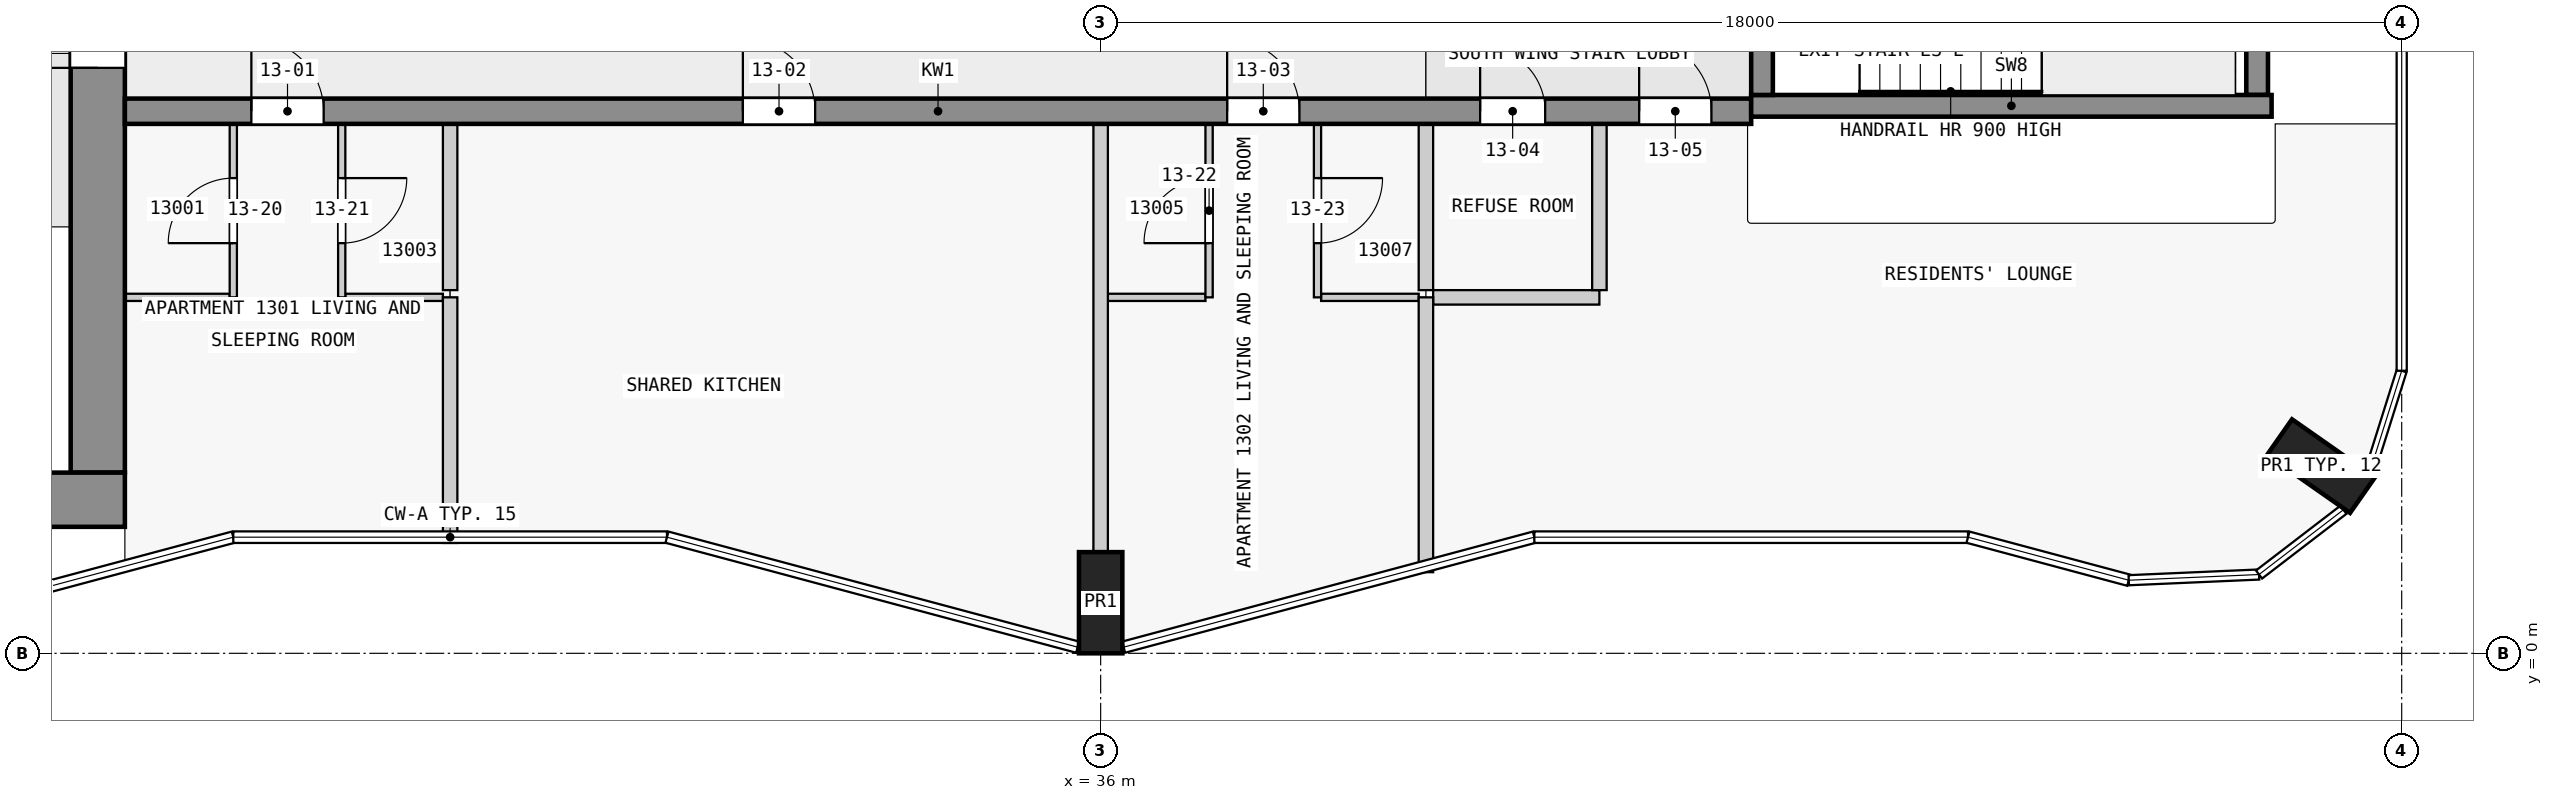
"""IFC4 building model, lengths in metres.
Left out: names, types, materials, properties, quantities, classifications, styles, units other than length and angle.
Written with IfcOpenShell. Run it as: python <this file> out.ifc"""

import sys

from ifc_helpers import new_model, si_unit, direction, frame, frame_2d, origin, origin_2d, place, context, subcontext, project, spatial, rectangle, extrude, element, fill, save


model = new_model("IFC4")
c1 = context("Model", 3, precision=1e-05, world=origin(), true_north=direction((0.0, 1.0)))
c2 = subcontext(c1, "Body", "Model", "MODEL_VIEW")
j1 = project(units=[si_unit("LENGTHUNIT", "METRE"), si_unit("PLANEANGLEUNIT", "RADIAN")], contexts=[c1])
p1 = place(None, origin())
s1 = spatial("IfcSite", under=j1, at=p1, CompositionType="ELEMENT")
p2 = place(p1, origin())
s2 = spatial("IfcBuilding", under=s1, at=p2, CompositionType="ELEMENT")
p3 = place(p2, frame((0.0, 0.0, 54.8)))
s3 = spatial("IfcBuildingStorey", under=s2, at=p3, CompositionType="ELEMENT", Elevation=54.8)
for number, where, z_axis, x_axis in (
    (1, (36.0, 0.7, 0.0), (0.0, 0.0, 1.0), (1.0, 0.0, 0.0)),
    (2, (52.884, 2.59, 0.0), (0.0, 0.0, 1.0), (0.574, 0.819, 0.0)),
):
    element("IfcColumn", number, at=place(p3, frame(where, z_axis=z_axis, x_axis=x_axis)), inside=s3, PredefinedType="COLUMN", context=c2, shape_type="SweptSolid", body=[
        extrude(rectangle(XDim=0.6, YDim=1.4, at=origin_2d()), origin(), (0.0, 0.0, 1.0), 3.5),
    ])
p4 = place(p3, frame((1.55, 2.125, 0.0), z_axis=(0.0, 0.0, 1.0), x_axis=(1.0, 0.0, 0.0)))
e3 = element("IfcWall", 3, at=p4, inside=s3, PredefinedType="SHEAR", context=c2, shape_type="SweptSolid", body=[
    extrude(rectangle(XDim=20.95, YDim=0.75, at=frame_2d((10.475, 0.0))), origin(), (0.0, 0.0, 1.0), 3.25),
])
p5 = place(p3, frame((22.125, 2.5, 0.0), z_axis=(0.0, 0.0, 1.0), x_axis=(0.0, 1.0, 0.0)))
e4 = element("IfcWall", 4, at=p5, inside=s3, PredefinedType="SHEAR", context=c2, shape_type="SweptSolid", body=[
    extrude(rectangle(XDim=14.75, YDim=0.75, at=frame_2d((7.375, 0.0))), origin(), (0.0, 0.0, 1.0), 3.25),
])
p6 = place(p5, frame((5.6, 0.0, 0.0)))
e5 = element("IfcOpeningElement", 5, at=p6, cuts=e4, PredefinedType="OPENING", context=c2, shape_type="SweptSolid", body=[
    extrude(rectangle(XDim=1.8, YDim=2.1, at=frame_2d((0.9, 1.05))), frame((0.0, 0.385, 0.0), z_axis=(0.0, -1.0, 0.0), x_axis=(1.0, 0.0, 0.0)), (0.0, 0.0, 1.0), 0.77),
])
p7 = place(p3, frame((45.15, 7.725, 0.0), z_axis=(0.0, 0.0, 1.0), x_axis=(0.0, 1.0, 0.0)))
e6 = element("IfcWall", 6, at=p7, inside=s3, PredefinedType="SHEAR", context=c2, shape_type="SweptSolid", body=[
    extrude(rectangle(XDim=2.55, YDim=0.3, at=frame_2d((1.275, 0.0))), origin(), (0.0, 0.0, 1.0), 3.5),
])
p8 = place(p7, frame((0.725, 0.0, 0.0)))
e7 = element("IfcOpeningElement", 7, at=p8, cuts=e6, PredefinedType="OPENING", context=c2, shape_type="SweptSolid", body=[
    extrude(rectangle(XDim=1.1, YDim=2.1, at=frame_2d((0.55, 1.05))), frame((0.0, 0.16, 0.0), z_axis=(0.0, -1.0, 0.0), x_axis=(1.0, 0.0, 0.0)), (0.0, 0.0, 1.0), 0.32),
])
p9 = place(p3, frame((52.0, 7.725, 0.0), z_axis=(0.0, 0.0, 1.0), x_axis=(0.0, 1.0, 0.0)))
e8 = element("IfcWall", 8, at=p9, inside=s3, PredefinedType="SHEAR", context=c2, shape_type="SweptSolid", body=[
    extrude(rectangle(XDim=2.55, YDim=0.3, at=frame_2d((1.275, 0.0))), origin(), (0.0, 0.0, 1.0), 3.5),
])
p10 = place(p3, frame((45.0, 7.575, 0.0), z_axis=(0.0, 0.0, 1.0), x_axis=(1.0, 0.0, 0.0)))
e9 = element("IfcWall", 9, at=p10, inside=s3, PredefinedType="SHEAR", context=c2, shape_type="SweptSolid", body=[
    extrude(rectangle(XDim=7.2, YDim=0.3, at=frame_2d((3.6, 0.0))), origin(), (0.0, 0.0, 1.0), 3.5),
])
p11 = place(p3, frame((22.5, 7.5, 0.0), z_axis=(0.0, 0.0, 1.0), x_axis=(1.0, 0.0, 0.0)))
e10 = element("IfcWall", 10, at=p11, inside=s3, PredefinedType="SHEAR", context=c2, shape_type="SweptSolid", body=[
    extrude(rectangle(XDim=22.5, YDim=0.35, at=frame_2d((11.25, 0.0))), origin(), (0.0, 0.0, 1.0), 3.25),
])
p12 = place(p11, frame((1.75, 0.0, 0.0)))
e11 = element("IfcOpeningElement", 11, at=p12, cuts=e10, PredefinedType="OPENING", context=c2, shape_type="SweptSolid", body=[
    extrude(rectangle(XDim=1.0, YDim=2.1, at=frame_2d((0.5, 1.05))), frame((0.0, 0.185, 0.0), z_axis=(0.0, -1.0, 0.0), x_axis=(1.0, 0.0, 0.0)), (0.0, 0.0, 1.0), 0.37),
])
p13 = place(p11, frame((8.55, 0.0, 0.0)))
e12 = element("IfcOpeningElement", 12, at=p13, cuts=e10, PredefinedType="OPENING", context=c2, shape_type="SweptSolid", body=[
    extrude(rectangle(XDim=1.0, YDim=2.1, at=frame_2d((0.5, 1.05))), frame((0.0, 0.185, 0.0), z_axis=(0.0, -1.0, 0.0), x_axis=(1.0, 0.0, 0.0)), (0.0, 0.0, 1.0), 0.37),
])
p14 = place(p11, frame((15.25, 0.0, 0.0)))
e13 = element("IfcOpeningElement", 13, at=p14, cuts=e10, PredefinedType="OPENING", context=c2, shape_type="SweptSolid", body=[
    extrude(rectangle(XDim=1.0, YDim=2.1, at=frame_2d((0.5, 1.05))), frame((0.0, 0.185, 0.0), z_axis=(0.0, -1.0, 0.0), x_axis=(1.0, 0.0, 0.0)), (0.0, 0.0, 1.0), 0.37),
])
p15 = place(p11, frame((18.75, 0.0, 0.0)))
e14 = element("IfcOpeningElement", 14, at=p15, cuts=e10, PredefinedType="OPENING", context=c2, shape_type="SweptSolid", body=[
    extrude(rectangle(XDim=0.9, YDim=2.1, at=frame_2d((0.45, 1.05))), frame((0.0, 0.185, 0.0), z_axis=(0.0, -1.0, 0.0), x_axis=(1.0, 0.0, 0.0)), (0.0, 0.0, 1.0), 0.37),
])
p16 = place(p11, frame((20.95, 0.0, 0.0)))
e15 = element("IfcOpeningElement", 15, at=p16, cuts=e10, PredefinedType="OPENING", context=c2, shape_type="SweptSolid", body=[
    extrude(rectangle(XDim=1.0, YDim=2.1, at=frame_2d((0.5, 1.05))), frame((0.0, 0.185, 0.0), z_axis=(0.0, -1.0, 0.0), x_axis=(1.0, 0.0, 0.0)), (0.0, 0.0, 1.0), 0.37),
])
p17 = place(p3, frame((22.5, 4.925, 0.0), z_axis=(0.0, 0.0, 1.0), x_axis=(1.0, 0.0, 0.0)))
e16 = element("IfcWall", 16, at=p17, inside=s3, PredefinedType="PARTITIONING", context=c2, shape_type="SweptSolid", body=[
    extrude(rectangle(XDim=1.45, YDim=0.1, at=frame_2d((0.725, 0.0))), origin(), (0.0, 0.0, 1.0), 3.25),
])
for number, where, z_axis, x_axis in (
    (17, (25.55, 4.925, 0.0), (0.0, 0.0, 1.0), (1.0, 0.0, 0.0)),
    (18, (36.1, 4.925, 0.0), (0.0, 0.0, 1.0), (1.0, 0.0, 0.0)),
    (19, (39.05, 4.925, 0.0), (0.0, 0.0, 1.0), (1.0, 0.0, 0.0)),
):
    element("IfcWall", number, at=place(p3, frame(where, z_axis=z_axis, x_axis=x_axis)), inside=s3, PredefinedType="PARTITIONING", context=c2, shape_type="SweptSolid", body=[
        extrude(rectangle(XDim=1.35, YDim=0.1, at=frame_2d((0.675, 0.0))), origin(), (0.0, 0.0, 1.0), 3.25),
    ])
p18 = place(p3, frame((40.6, 4.925, 0.0), z_axis=(0.0, 0.0, 1.0), x_axis=(1.0, 0.0, 0.0)))
e20 = element("IfcWall", 20, at=p18, inside=s3, PredefinedType="PARTITIONING", context=c2, shape_type="SweptSolid", body=[
    extrude(rectangle(XDim=2.3, YDim=0.2, at=frame_2d((1.15, 0.0))), origin(), (0.0, 0.0, 1.0), 3.25),
])
p19 = place(p3, frame((24.0, 4.925, 0.0), z_axis=(0.0, 0.0, 1.0), x_axis=(0.0, 1.0, 0.0)))
e21 = element("IfcWall", 21, at=p19, inside=s3, PredefinedType="PARTITIONING", context=c2, shape_type="SweptSolid", body=[
    extrude(rectangle(XDim=2.4, YDim=0.1, at=frame_2d((1.2, 0.0))), origin(), (0.0, 0.0, 1.0), 3.25),
])
p20 = place(p19, frame((0.75, 0.0, 0.0)))
e22 = element("IfcOpeningElement", 22, at=p20, cuts=e21, PredefinedType="OPENING", context=c2, shape_type="SweptSolid", body=[
    extrude(rectangle(XDim=0.9, YDim=2.1, at=frame_2d((0.45, 1.05))), frame((0.0, 0.06, 0.0), z_axis=(0.0, -1.0, 0.0), x_axis=(1.0, 0.0, 0.0)), (0.0, 0.0, 1.0), 0.12),
])
p21 = place(p3, frame((25.5, 7.325, 0.0), z_axis=(0.0, 0.0, 1.0), x_axis=(0.0, -1.0, 0.0)))
e23 = element("IfcWall", 23, at=p21, inside=s3, PredefinedType="PARTITIONING", context=c2, shape_type="SweptSolid", body=[
    extrude(rectangle(XDim=2.4, YDim=0.1, at=frame_2d((1.2, 0.0))), origin(), (0.0, 0.0, 1.0), 3.25),
])
p22 = place(p21, frame((0.75, 0.0, 0.0)))
e24 = element("IfcOpeningElement", 24, at=p22, cuts=e23, PredefinedType="OPENING", context=c2, shape_type="SweptSolid", body=[
    extrude(rectangle(XDim=0.9, YDim=2.1, at=frame_2d((0.45, 1.05))), frame((0.0, 0.06, 0.0), z_axis=(0.0, -1.0, 0.0), x_axis=(1.0, 0.0, 0.0)), (0.0, 0.0, 1.0), 0.12),
])
p23 = place(p3, frame((27.0, 4.925, 0.0), z_axis=(0.0, 0.0, 1.0), x_axis=(0.0, -1.0, 0.0)))
e25 = element("IfcWall", 25, at=p23, inside=s3, PredefinedType="PARTITIONING", context=c2, shape_type="SweptSolid", body=[
    extrude(rectangle(XDim=3.398, YDim=0.2, at=frame_2d((1.699, 0.0))), origin(), (0.0, 0.0, 1.0), 3.25),
])
p24 = place(p3, frame((27.0, 5.025, 0.0), z_axis=(0.0, 0.0, 1.0), x_axis=(0.0, 1.0, 0.0)))
e26 = element("IfcWall", 26, at=p24, inside=s3, PredefinedType="PARTITIONING", context=c2, shape_type="SweptSolid", body=[
    extrude(rectangle(XDim=2.3, YDim=0.2, at=frame_2d((1.15, 0.0))), origin(), (0.0, 0.0, 1.0), 3.25),
])
p25 = place(p3, frame((36.0, 1.4, 0.0), z_axis=(0.0, 0.0, 1.0), x_axis=(0.0, 1.0, 0.0)))
e27 = element("IfcWall", 27, at=p25, inside=s3, PredefinedType="PARTITIONING", context=c2, shape_type="SweptSolid", body=[
    extrude(rectangle(XDim=5.925, YDim=0.2, at=frame_2d((2.962, 0.0))), origin(), (0.0, 0.0, 1.0), 3.25),
])
p26 = place(p3, frame((37.5, 4.925, 0.0), z_axis=(0.0, 0.0, 1.0), x_axis=(0.0, 1.0, 0.0)))
e28 = element("IfcWall", 28, at=p26, inside=s3, PredefinedType="PARTITIONING", context=c2, shape_type="SweptSolid", body=[
    extrude(rectangle(XDim=2.4, YDim=0.1, at=frame_2d((1.2, 0.0))), origin(), (0.0, 0.0, 1.0), 3.25),
])
p27 = place(p26, frame((0.75, 0.0, 0.0)))
e29 = element("IfcOpeningElement", 29, at=p27, cuts=e28, PredefinedType="OPENING", context=c2, shape_type="SweptSolid", body=[
    extrude(rectangle(XDim=0.9, YDim=2.1, at=frame_2d((0.45, 1.05))), frame((0.0, 0.06, 0.0), z_axis=(0.0, -1.0, 0.0), x_axis=(1.0, 0.0, 0.0)), (0.0, 0.0, 1.0), 0.12),
])
p28 = place(p3, frame((39.0, 7.325, 0.0), z_axis=(0.0, 0.0, 1.0), x_axis=(0.0, -1.0, 0.0)))
e30 = element("IfcWall", 30, at=p28, inside=s3, PredefinedType="PARTITIONING", context=c2, shape_type="SweptSolid", body=[
    extrude(rectangle(XDim=2.4, YDim=0.1, at=frame_2d((1.2, 0.0))), origin(), (0.0, 0.0, 1.0), 3.25),
])
p29 = place(p28, frame((0.75, 0.0, 0.0)))
e31 = element("IfcOpeningElement", 31, at=p29, cuts=e30, PredefinedType="OPENING", context=c2, shape_type="SweptSolid", body=[
    extrude(rectangle(XDim=0.9, YDim=2.1, at=frame_2d((0.45, 1.05))), frame((0.0, 0.06, 0.0), z_axis=(0.0, -1.0, 0.0), x_axis=(1.0, 0.0, 0.0)), (0.0, 0.0, 1.0), 0.12),
])
p30 = place(p3, frame((40.5, 4.925, 0.0), z_axis=(0.0, 0.0, 1.0), x_axis=(0.0, -1.0, 0.0)))
e32 = element("IfcWall", 32, at=p30, inside=s3, PredefinedType="PARTITIONING", context=c2, shape_type="SweptSolid", body=[
    extrude(rectangle(XDim=3.803, YDim=0.2, at=frame_2d((1.901, 0.0))), origin(), (0.0, 0.0, 1.0), 3.25),
])
for number, where, z_axis, x_axis in (
    (33, (40.5, 5.025, 0.0), (0.0, 0.0, 1.0), (0.0, 1.0, 0.0)),
    (34, (42.9, 5.025, 0.0), (0.0, 0.0, 1.0), (0.0, 1.0, 0.0)),
):
    element("IfcWall", number, at=place(p3, frame(where, z_axis=z_axis, x_axis=x_axis)), inside=s3, PredefinedType="PARTITIONING", context=c2, shape_type="SweptSolid", body=[
        extrude(rectangle(XDim=2.3, YDim=0.2, at=frame_2d((1.15, 0.0))), origin(), (0.0, 0.0, 1.0), 3.25),
    ])
p31 = place(p6, origin())
e35 = element("IfcDoor", 35, at=p31, inside=s3, OperationType="DOUBLE_DOOR_SINGLE_SWING", PredefinedType="DOOR", context=c2, shape_type="SweptSolid", body=[
    extrude(rectangle(XDim=1.8, YDim=2.1, at=frame_2d((0.9, 1.05))), frame((0.0, 0.025, 0.0), z_axis=(0.0, -1.0, 0.0), x_axis=(1.0, 0.0, 0.0)), (0.0, 0.0, 1.0), 0.05),
])
fill(e5, e35)
p32 = place(p12, origin())
e36 = element("IfcDoor", 36, at=p32, inside=s3, OperationType="SINGLE_SWING_LEFT", PredefinedType="DOOR", context=c2, shape_type="SweptSolid", body=[
    extrude(rectangle(XDim=1.0, YDim=2.1, at=frame_2d((0.5, 1.05))), frame((0.0, 0.025, 0.0), z_axis=(0.0, -1.0, 0.0), x_axis=(1.0, 0.0, 0.0)), (0.0, 0.0, 1.0), 0.05),
])
fill(e11, e36)
p33 = place(p13, origin())
e37 = element("IfcDoor", 37, at=p33, inside=s3, OperationType="SINGLE_SWING_LEFT", PredefinedType="DOOR", context=c2, shape_type="SweptSolid", body=[
    extrude(rectangle(XDim=1.0, YDim=2.1, at=frame_2d((0.5, 1.05))), frame((0.0, 0.025, 0.0), z_axis=(0.0, -1.0, 0.0), x_axis=(1.0, 0.0, 0.0)), (0.0, 0.0, 1.0), 0.05),
])
fill(e12, e37)
p34 = place(p14, origin())
e38 = element("IfcDoor", 38, at=p34, inside=s3, OperationType="SINGLE_SWING_RIGHT", PredefinedType="DOOR", context=c2, shape_type="SweptSolid", body=[
    extrude(rectangle(XDim=1.0, YDim=2.1, at=frame_2d((0.5, 1.05))), frame((0.0, 0.025, 0.0), z_axis=(0.0, -1.0, 0.0), x_axis=(1.0, 0.0, 0.0)), (0.0, 0.0, 1.0), 0.05),
])
fill(e13, e38)
p35 = place(p15, origin())
e39 = element("IfcDoor", 39, at=p35, inside=s3, OperationType="SINGLE_SWING_RIGHT", PredefinedType="DOOR", context=c2, shape_type="SweptSolid", body=[
    extrude(rectangle(XDim=0.9, YDim=2.1, at=frame_2d((0.45, 1.05))), frame((0.0, 0.025, 0.0), z_axis=(0.0, -1.0, 0.0), x_axis=(1.0, 0.0, 0.0)), (0.0, 0.0, 1.0), 0.05),
])
fill(e14, e39)
p36 = place(p16, origin())
e40 = element("IfcDoor", 40, at=p36, inside=s3, OperationType="SINGLE_SWING_RIGHT", PredefinedType="DOOR", context=c2, shape_type="SweptSolid", body=[
    extrude(rectangle(XDim=1.0, YDim=2.1, at=frame_2d((0.5, 1.05))), frame((0.0, 0.025, 0.0), z_axis=(0.0, -1.0, 0.0), x_axis=(1.0, 0.0, 0.0)), (0.0, 0.0, 1.0), 0.05),
])
fill(e15, e40)
p37 = place(p20, origin())
e41 = element("IfcDoor", 41, at=p37, inside=s3, OperationType="SINGLE_SWING_LEFT", PredefinedType="DOOR", context=c2, shape_type="SweptSolid", body=[
    extrude(rectangle(XDim=0.9, YDim=2.1, at=frame_2d((0.45, 1.05))), frame((0.0, 0.025, 0.0), z_axis=(0.0, -1.0, 0.0), x_axis=(1.0, 0.0, 0.0)), (0.0, 0.0, 1.0), 0.05),
])
fill(e22, e41)
p38 = place(p22, origin())
e42 = element("IfcDoor", 42, at=p38, inside=s3, OperationType="SINGLE_SWING_LEFT", PredefinedType="DOOR", context=c2, shape_type="SweptSolid", body=[
    extrude(rectangle(XDim=0.9, YDim=2.1, at=frame_2d((0.45, 1.05))), frame((0.0, 0.025, 0.0), z_axis=(0.0, -1.0, 0.0), x_axis=(1.0, 0.0, 0.0)), (0.0, 0.0, 1.0), 0.05),
])
fill(e24, e42)
p39 = place(p27, origin())
e43 = element("IfcDoor", 43, at=p39, inside=s3, OperationType="SINGLE_SWING_LEFT", PredefinedType="DOOR", context=c2, shape_type="SweptSolid", body=[
    extrude(rectangle(XDim=0.9, YDim=2.1, at=frame_2d((0.45, 1.05))), frame((0.0, 0.025, 0.0), z_axis=(0.0, -1.0, 0.0), x_axis=(1.0, 0.0, 0.0)), (0.0, 0.0, 1.0), 0.05),
])
fill(e29, e43)
p40 = place(p29, origin())
e44 = element("IfcDoor", 44, at=p40, inside=s3, OperationType="SINGLE_SWING_LEFT", PredefinedType="DOOR", context=c2, shape_type="SweptSolid", body=[
    extrude(rectangle(XDim=0.9, YDim=2.1, at=frame_2d((0.45, 1.05))), frame((0.0, 0.025, 0.0), z_axis=(0.0, -1.0, 0.0), x_axis=(1.0, 0.0, 0.0)), (0.0, 0.0, 1.0), 0.05),
])
fill(e31, e44)
save(model, sys.argv[1])
